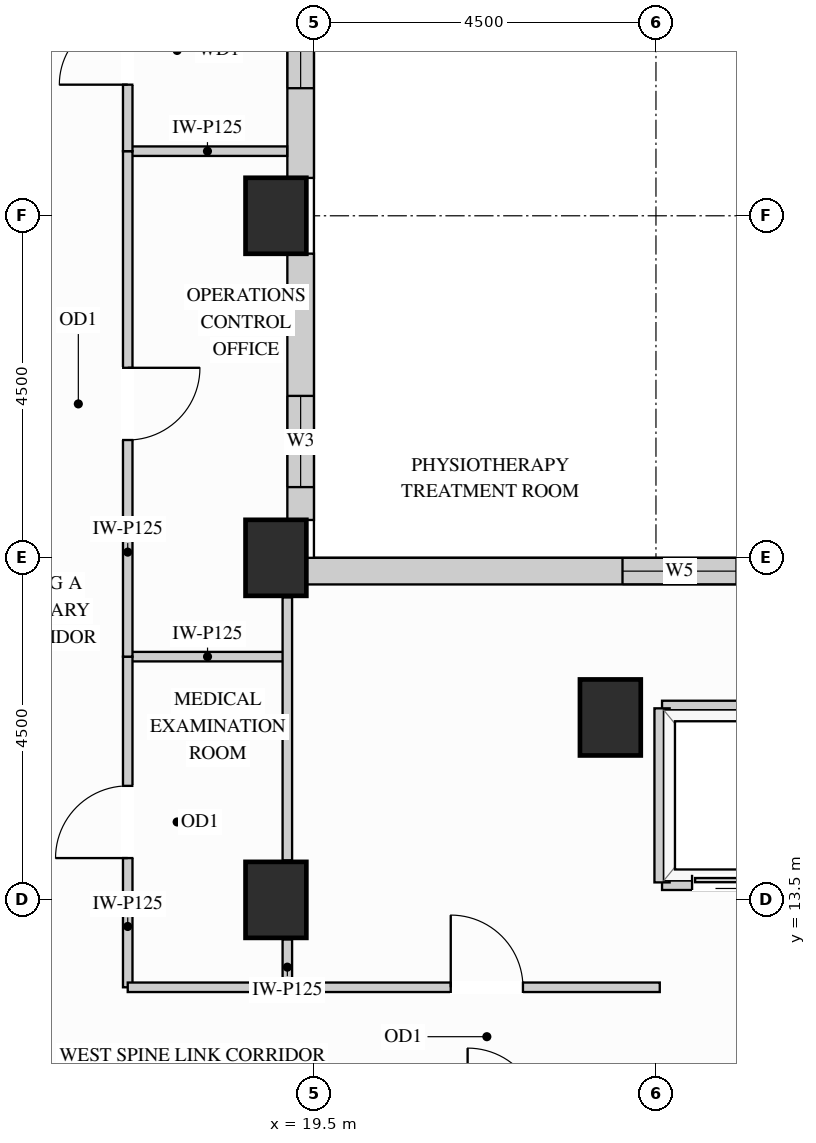
"""IFC4 building model, lengths in metres.
Left out: names, types, materials, properties, quantities, classifications, styles, units other than length and angle.
Written with IfcOpenShell. Run it as: python <this file> out.ifc"""

import sys

from ifc_helpers import new_model, si_unit, direction, frame, frame_2d, origin, origin_2d, place, context, subcontext, project, spatial, rectangle, extrude, source, transform, mapped, element, fill, save


model = new_model("IFC4")
c1 = context("Model", 3, precision=1e-05, world=origin(), true_north=direction((0.0, 1.0)))
c2 = subcontext(c1, "Body", "Model", "MODEL_VIEW")
j1 = project(units=[si_unit("LENGTHUNIT", "METRE"), si_unit("PLANEANGLEUNIT", "RADIAN")], contexts=[c1])
p1 = place(None, origin())
s1 = spatial("IfcSite", under=j1, at=p1, CompositionType="ELEMENT")
p2 = place(p1, origin())
s2 = spatial("IfcBuilding", under=s1, at=p2, CompositionType="ELEMENT")
p3 = place(p2, frame((0.0, 0.0, 157.5)))
s3 = spatial("IfcBuildingStorey", under=s2, at=p3, CompositionType="ELEMENT", Elevation=157.5)
m1 = source(origin(), c2, "Body", "SweptSolid", [
    extrude(rectangle(XDim=0.8, YDim=1.0, at=origin_2d()), origin(), (0.0, 0.0, 1.0), 3.4),
])
for number, where, z_axis, x_axis in (
    (1, (19.0, 13.5, 0.0), (0.0, 0.0, 1.0), (1.0, 0.0, 0.0)),
    (2, (19.0, 18.0, 0.0), (0.0, 0.0, 1.0), (1.0, 0.0, 0.0)),
    (3, (19.0, 22.5, 0.0), (0.0, 0.0, 1.0), (1.0, 0.0, 0.0)),
    (4, (23.4, 15.9, 0.0), (0.0, 0.0, 1.0), (1.0, 0.0, 0.0)),
):
    element("IfcColumn", number, at=place(p3, frame(where, z_axis=z_axis, x_axis=x_axis)), inside=s3, PredefinedType="COLUMN", context=c2, shape_type="MappedRepresentation", body=[
        mapped(m1, transform((0.0, 0.0, 0.0), x_axis=(1.0, 0.0, 0.0), y_axis=(0.0, 1.0, 0.0), z_axis=(0.0, 0.0, 1.0))),
    ])
p4 = place(p3, frame((34.502, 17.825, 0.0), z_axis=(0.0, 0.0, 1.0), x_axis=(-1.0, 0.0, 0.0)))
e5 = element("IfcWall", 5, at=p4, inside=s3, PredefinedType="SOLIDWALL", context=c2, shape_type="SweptSolid", body=[
    extrude(rectangle(XDim=15.104, YDim=0.35, at=frame_2d((7.552, 0.0))), origin(), (0.0, 0.0, 1.0), 3.385),
])
p5 = place(p4, frame((4.131, 0.0, 0.78)))
e6 = element("IfcOpeningElement", 6, at=p5, cuts=e5, PredefinedType="OPENING", context=c2, shape_type="SweptSolid", body=[
    extrude(rectangle(XDim=1.5, YDim=2.0, at=frame_2d((0.75, 1.0))), frame((0.0, 0.185, 0.0), z_axis=(0.0, -1.0, 0.0), x_axis=(1.0, 0.0, 0.0)), (0.0, 0.0, 1.0), 0.37),
])
p6 = place(p4, frame((9.442, 0.0, 0.78)))
e7 = element("IfcOpeningElement", 7, at=p6, cuts=e5, PredefinedType="OPENING", context=c2, shape_type="SweptSolid", body=[
    extrude(rectangle(XDim=1.5, YDim=2.0, at=frame_2d((0.75, 1.0))), frame((0.0, 0.185, 0.0), z_axis=(0.0, -1.0, 0.0), x_axis=(1.0, 0.0, 0.0)), (0.0, 0.0, 1.0), 0.37),
])
p7 = place(p3, frame((19.325, 18.498, 0.0), z_axis=(0.0, 0.0, 1.0), x_axis=(0.0, 1.0, 0.0)))
e8 = element("IfcWall", 8, at=p7, inside=s3, PredefinedType="SOLIDWALL", context=c2, shape_type="SweptSolid", body=[
    extrude(rectangle(XDim=3.504, YDim=0.35, at=frame_2d((1.752, 0.0))), origin(), (0.0, 0.0, 1.0), 2.612),
])
p8 = place(p7, frame((0.433, 0.0, 0.78)))
e9 = element("IfcOpeningElement", 9, at=p8, cuts=e8, PredefinedType="OPENING", context=c2, shape_type="SweptSolid", body=[
    extrude(rectangle(XDim=1.2, YDim=1.652, at=frame_2d((0.6, 0.826))), frame((0.0, 0.185, 0.0), z_axis=(0.0, -1.0, 0.0), x_axis=(1.0, 0.0, 0.0)), (0.0, 0.0, 1.0), 0.37),
])
p9 = place(p3, frame((19.325, 22.998, 0.0), z_axis=(0.0, 0.0, 1.0), x_axis=(0.0, 1.0, 0.0)))
e10 = element("IfcWall", 10, at=p9, inside=s3, PredefinedType="SOLIDWALL", context=c2, shape_type="SweptSolid", body=[
    extrude(rectangle(XDim=3.304, YDim=0.35, at=frame_2d((1.652, 0.0))), origin(), (0.0, 0.0, 1.0), 2.612),
])
p10 = place(p9, frame((1.18, 0.0, 0.78)))
e11 = element("IfcOpeningElement", 11, at=p10, cuts=e10, PredefinedType="OPENING", context=c2, shape_type="SweptSolid", body=[
    extrude(rectangle(XDim=1.5, YDim=1.652, at=frame_2d((0.75, 0.826))), frame((0.0, 0.185, 0.0), z_axis=(0.0, -1.0, 0.0), x_axis=(1.0, 0.0, 0.0)), (0.0, 0.0, 1.0), 0.37),
])
m2 = source(origin(), c2, "Body", "SweptSolid", [
    extrude(rectangle(XDim=2.1, YDim=0.125, at=frame_2d((1.05, 0.0))), origin(), (0.0, 0.0, 1.0), 2.916),
])
p11 = place(p3, frame((17.05, 16.7, 0.0), z_axis=(0.0, 0.0, 1.0), x_axis=(1.0, 0.0, 0.0)))
e12 = element("IfcWall", 12, at=p11, inside=s3, PredefinedType="PARTITIONING", context=c2, shape_type="MappedRepresentation", body=[
    mapped(m2, transform((0.0, 0.0, 0.0), x_axis=(1.0, 0.0, 0.0), y_axis=(0.0, 1.0, 0.0), z_axis=(0.0, 0.0, 1.0))),
])
m3 = source(origin(), c2, "Body", "SweptSolid", [
    extrude(rectangle(XDim=2.098, YDim=0.125, at=frame_2d((1.049, 0.0))), origin(), (0.0, 0.0, 1.0), 3.385),
])
p12 = place(p3, frame((17.05, 23.35, 0.0), z_axis=(0.0, 0.0, 1.0), x_axis=(1.0, 0.0, 0.0)))
e13 = element("IfcWall", 13, at=p12, inside=s3, PredefinedType="PARTITIONING", context=c2, shape_type="MappedRepresentation", body=[
    mapped(m3, transform((0.0, 0.0, 0.0), x_axis=(1.0, 0.0, 0.0), y_axis=(0.0, 1.0, 0.0), z_axis=(0.0, 0.0, 1.0))),
])
m4 = source(origin(), c2, "Body", "SweptSolid", [
    extrude(rectangle(XDim=0.63, YDim=0.125, at=frame_2d((0.315, 0.0))), origin(), (0.0, 0.0, 1.0), 2.773),
])
p13 = place(p3, frame((19.15, 12.35, 0.0), z_axis=(0.0, 0.0, 1.0), x_axis=(0.0, 1.0, 0.0)))
e14 = element("IfcWall", 14, at=p13, inside=s3, PredefinedType="PARTITIONING", context=c2, shape_type="MappedRepresentation", body=[
    mapped(m4, transform((0.0, 0.0, 0.0), x_axis=(1.0, 0.0, 0.0), y_axis=(0.0, 1.0, 0.0), z_axis=(0.0, 0.0, 1.0))),
])
m5 = source(origin(), c2, "Body", "SweptSolid", [
    extrude(rectangle(XDim=3.46, YDim=0.125, at=frame_2d((1.73, 0.0))), origin(), (0.0, 0.0, 1.0), 2.773),
])
p14 = place(p3, frame((19.15, 14.02, 0.0), z_axis=(0.0, 0.0, 1.0), x_axis=(0.0, 1.0, 0.0)))
e15 = element("IfcWall", 15, at=p14, inside=s3, PredefinedType="PARTITIONING", context=c2, shape_type="MappedRepresentation", body=[
    mapped(m5, transform((0.0, 0.0, 0.0), x_axis=(1.0, 0.0, 0.0), y_axis=(0.0, 1.0, 0.0), z_axis=(0.0, 0.0, 1.0))),
])
p15 = place(p3, frame((17.05, 12.35, 0.0), z_axis=(0.0, 0.0, 1.0), x_axis=(0.0, 1.0, 0.0)))
e16 = element("IfcWall", 16, at=p15, inside=s3, PredefinedType="PARTITIONING", context=c2, shape_type="SweptSolid", body=[
    extrude(rectangle(XDim=4.35, YDim=0.125, at=frame_2d((2.175, 0.0))), origin(), (0.0, 0.0, 1.0), 3.385),
])
p16 = place(p15, frame((1.7, 0.0, 0.0)))
e17 = element("IfcOpeningElement", 17, at=p16, cuts=e16, PredefinedType="OPENING", context=c2, shape_type="SweptSolid", body=[
    extrude(rectangle(XDim=0.95, YDim=2.15, at=frame_2d((0.475, 1.075))), frame((0.0, 0.073, 0.0), z_axis=(0.0, -1.0, 0.0), x_axis=(1.0, 0.0, 0.0)), (0.0, 0.0, 1.0), 0.145),
])
p17 = place(p3, frame((17.05, 16.7, 0.0), z_axis=(0.0, 0.0, 1.0), x_axis=(0.0, 1.0, 0.0)))
e18 = element("IfcWall", 18, at=p17, inside=s3, PredefinedType="PARTITIONING", context=c2, shape_type="SweptSolid", body=[
    extrude(rectangle(XDim=6.65, YDim=0.125, at=frame_2d((3.325, 0.0))), origin(), (0.0, 0.0, 1.0), 3.385),
])
p18 = place(p17, frame((2.85, 0.0, 0.0)))
e19 = element("IfcOpeningElement", 19, at=p18, cuts=e18, PredefinedType="OPENING", context=c2, shape_type="SweptSolid", body=[
    extrude(rectangle(XDim=0.95, YDim=2.15, at=frame_2d((0.475, 1.075))), frame((0.0, 0.073, 0.0), z_axis=(0.0, -1.0, 0.0), x_axis=(1.0, 0.0, 0.0)), (0.0, 0.0, 1.0), 0.145),
])
p19 = place(p3, frame((17.05, 23.35, 0.0), z_axis=(0.0, 0.0, 1.0), x_axis=(0.0, 1.0, 0.0)))
e20 = element("IfcWall", 20, at=p19, inside=s3, PredefinedType="PARTITIONING", context=c2, shape_type="SweptSolid", body=[
    extrude(rectangle(XDim=2.7, YDim=0.125, at=frame_2d((1.35, 0.0))), origin(), (0.0, 0.0, 1.0), 3.385),
])
p20 = place(p19, frame((0.875, 0.0, 0.0)))
e21 = element("IfcOpeningElement", 21, at=p20, cuts=e20, PredefinedType="OPENING", context=c2, shape_type="SweptSolid", body=[
    extrude(rectangle(XDim=0.9, YDim=2.15, at=frame_2d((0.45, 1.075))), frame((0.0, 0.073, 0.0), z_axis=(0.0, -1.0, 0.0), x_axis=(1.0, 0.0, 0.0)), (0.0, 0.0, 1.0), 0.145),
])
m6 = source(origin(), c2, "Body", "SweptSolid", [
    extrude(rectangle(XDim=2.45, YDim=0.125, at=frame_2d((1.225, 0.0))), origin(), (0.0, 0.0, 1.0), 3.385),
])
p21 = place(p3, frame((17.05, 12.35, 0.0), z_axis=(0.0, 0.0, 1.0), x_axis=(1.0, 0.0, 0.0)))
e22 = element("IfcWall", 22, at=p21, inside=s3, PredefinedType="PARTITIONING", context=c2, shape_type="MappedRepresentation", body=[
    mapped(m6, transform((0.0, 0.0, 0.0), x_axis=(1.0, 0.0, 0.0), y_axis=(0.0, 1.0, 0.0), z_axis=(0.0, 0.0, 1.0))),
])
p22 = place(p3, frame((19.5, 12.35, 0.0), z_axis=(0.0, 0.0, 1.0), x_axis=(1.0, 0.0, 0.0)))
e23 = element("IfcWall", 23, at=p22, inside=s3, PredefinedType="PARTITIONING", context=c2, shape_type="SweptSolid", body=[
    extrude(rectangle(XDim=4.55, YDim=0.125, at=frame_2d((2.275, 0.0))), origin(), (0.0, 0.0, 1.0), 3.385),
])
p23 = place(p22, frame((1.8, 0.0, 0.0)))
e24 = element("IfcOpeningElement", 24, at=p23, cuts=e23, PredefinedType="OPENING", context=c2, shape_type="SweptSolid", body=[
    extrude(rectangle(XDim=0.95, YDim=2.15, at=frame_2d((0.475, 1.075))), frame((0.0, 0.073, 0.0), z_axis=(0.0, -1.0, 0.0), x_axis=(1.0, 0.0, 0.0)), (0.0, 0.0, 1.0), 0.145),
])
m7 = source(origin(), c2, "Body", "SweptSolid", [
    extrude(rectangle(XDim=1.89, YDim=0.2, at=frame_2d((0.945, 0.0))), origin(), (0.0, 0.0, 1.0), 2.773),
])
p24 = place(p3, frame((24.08, 16.02, 0.0), z_axis=(0.0, 0.0, 1.0), x_axis=(1.0, 0.0, 0.0)))
e25 = element("IfcWall", 25, at=p24, inside=s3, PredefinedType="PARTITIONING", context=c2, shape_type="MappedRepresentation", body=[
    mapped(m7, transform((0.0, 0.0, 0.0), x_axis=(1.0, 0.0, 0.0), y_axis=(0.0, 1.0, 0.0), z_axis=(0.0, 0.0, 1.0))),
])
p25 = place(p3, frame((24.08, 13.73, 0.0), z_axis=(0.0, 0.0, 1.0), x_axis=(1.0, 0.0, 0.0)))
e26 = element("IfcWall", 26, at=p25, inside=s3, PredefinedType="PARTITIONING", context=c2, shape_type="SweptSolid", body=[
    extrude(rectangle(XDim=1.89, YDim=0.2, at=frame_2d((0.945, 0.0))), origin(), (0.0, 0.0, 1.0), 2.466),
])
p26 = place(p25, frame((0.395, 0.0, 0.0)))
e27 = element("IfcOpeningElement", 27, at=p26, cuts=e26, PredefinedType="OPENING", context=c2, shape_type="SweptSolid", body=[
    extrude(rectangle(XDim=1.1, YDim=2.2, at=frame_2d((0.55, 1.1))), frame((0.0, 0.11, 0.0), z_axis=(0.0, -1.0, 0.0), x_axis=(1.0, 0.0, 0.0)), (0.0, 0.0, 1.0), 0.22),
])
m8 = source(origin(), c2, "Body", "SweptSolid", [
    extrude(rectangle(XDim=2.29, YDim=0.2, at=frame_2d((1.145, 0.0))), origin(), (0.0, 0.0, 1.0), 3.385),
])
p27 = place(p3, frame((24.08, 13.73, 0.0), z_axis=(0.0, 0.0, 1.0), x_axis=(0.0, 1.0, 0.0)))
e28 = element("IfcWall", 28, at=p27, inside=s3, PredefinedType="PARTITIONING", context=c2, shape_type="MappedRepresentation", body=[
    mapped(m8, transform((0.0, 0.0, 0.0), x_axis=(1.0, 0.0, 0.0), y_axis=(0.0, 1.0, 0.0), z_axis=(0.0, 0.0, 1.0))),
])
m9 = source(origin(), c2, "Body", "SweptSolid", [
    extrude(rectangle(XDim=1.1, YDim=2.2, at=frame_2d((0.55, 1.1))), frame((0.0, 0.025, 0.0), z_axis=(0.0, -1.0, 0.0), x_axis=(1.0, 0.0, 0.0)), (0.0, 0.0, 1.0), 0.05),
])
p28 = place(p26, origin())
e29 = element("IfcDoor", 29, at=p28, inside=s3, OperationType="SLIDING_TO_LEFT", PredefinedType="DOOR", context=c2, shape_type="MappedRepresentation", body=[
    mapped(m9, transform((0.0, 0.0, 0.0), x_axis=(1.0, 0.0, 0.0), y_axis=(0.0, 1.0, 0.0), z_axis=(0.0, 0.0, 1.0))),
])
fill(e27, e29)
m10 = source(origin(), c2, "Body", "SweptSolid", [
    extrude(rectangle(XDim=0.95, YDim=2.15, at=frame_2d((0.475, 1.075))), frame((0.0, 0.025, 0.0), z_axis=(0.0, -1.0, 0.0), x_axis=(1.0, 0.0, 0.0)), (0.0, 0.0, 1.0), 0.05),
])
p29 = place(p16, origin())
e30 = element("IfcDoor", 30, at=p29, inside=s3, OperationType="SINGLE_SWING_LEFT", PredefinedType="DOOR", context=c2, shape_type="MappedRepresentation", body=[
    mapped(m10, transform((0.0, 0.0, 0.0), x_axis=(1.0, 0.0, 0.0), y_axis=(0.0, 1.0, 0.0), z_axis=(0.0, 0.0, 1.0))),
])
fill(e17, e30)
p30 = place(p18, origin())
e31 = element("IfcDoor", 31, at=p30, inside=s3, OperationType="SINGLE_SWING_RIGHT", PredefinedType="DOOR", context=c2, shape_type="MappedRepresentation", body=[
    mapped(m10, transform((0.0, 0.0, 0.0), x_axis=(1.0, 0.0, 0.0), y_axis=(0.0, 1.0, 0.0), z_axis=(0.0, 0.0, 1.0))),
])
fill(e19, e31)
p31 = place(p23, origin())
e32 = element("IfcDoor", 32, at=p31, inside=s3, OperationType="SINGLE_SWING_LEFT", PredefinedType="DOOR", context=c2, shape_type="MappedRepresentation", body=[
    mapped(m10, transform((0.0, 0.0, 0.0), x_axis=(1.0, 0.0, 0.0), y_axis=(0.0, 1.0, 0.0), z_axis=(0.0, 0.0, 1.0))),
])
fill(e24, e32)
m11 = source(origin(), c2, "Body", "SweptSolid", [
    extrude(rectangle(XDim=0.9, YDim=2.15, at=frame_2d((0.45, 1.075))), frame((0.0, 0.025, 0.0), z_axis=(0.0, -1.0, 0.0), x_axis=(1.0, 0.0, 0.0)), (0.0, 0.0, 1.0), 0.05),
])
p32 = place(p20, origin())
e33 = element("IfcDoor", 33, at=p32, inside=s3, OperationType="SINGLE_SWING_LEFT", PredefinedType="DOOR", context=c2, shape_type="MappedRepresentation", body=[
    mapped(m11, transform((0.0, 0.0, 0.0), x_axis=(1.0, 0.0, 0.0), y_axis=(0.0, 1.0, 0.0), z_axis=(0.0, 0.0, 1.0))),
])
fill(e21, e33)
m12 = source(origin(), c2, "Body", "SweptSolid", [
    extrude(rectangle(XDim=1.2, YDim=1.652, at=frame_2d((0.6, 0.826))), frame((0.0, 0.03, 0.0), z_axis=(0.0, -1.0, 0.0), x_axis=(1.0, 0.0, 0.0)), (0.0, 0.0, 1.0), 0.06),
])
p33 = place(p8, origin())
e34 = element("IfcWindow", 34, at=p33, inside=s3, PartitioningType="SINGLE_PANEL", PredefinedType="WINDOW", context=c2, shape_type="MappedRepresentation", body=[
    mapped(m12, transform((0.0, 0.0, 0.0), x_axis=(1.0, 0.0, 0.0), y_axis=(0.0, 1.0, 0.0), z_axis=(0.0, 0.0, 1.0))),
])
fill(e9, e34)
m13 = source(origin(), c2, "Body", "SweptSolid", [
    extrude(rectangle(XDim=1.5, YDim=2.0, at=frame_2d((0.75, 1.0))), frame((0.0, 0.03, 0.0), z_axis=(0.0, -1.0, 0.0), x_axis=(1.0, 0.0, 0.0)), (0.0, 0.0, 1.0), 0.06),
])
p34 = place(p6, origin())
e35 = element("IfcWindow", 35, at=p34, inside=s3, PartitioningType="SINGLE_PANEL", PredefinedType="WINDOW", context=c2, shape_type="MappedRepresentation", body=[
    mapped(m13, transform((0.0, 0.0, 0.0), x_axis=(1.0, 0.0, 0.0), y_axis=(0.0, 1.0, 0.0), z_axis=(0.0, 0.0, 1.0))),
])
fill(e7, e35)
m14 = source(origin(), c2, "Body", "SweptSolid", [
    extrude(rectangle(XDim=1.5, YDim=1.652, at=frame_2d((0.75, 0.826))), frame((0.0, 0.03, 0.0), z_axis=(0.0, -1.0, 0.0), x_axis=(1.0, 0.0, 0.0)), (0.0, 0.0, 1.0), 0.06),
])
p35 = place(p10, origin())
e36 = element("IfcWindow", 36, at=p35, inside=s3, PartitioningType="SINGLE_PANEL", PredefinedType="WINDOW", context=c2, shape_type="MappedRepresentation", body=[
    mapped(m14, transform((0.0, 0.0, 0.0), x_axis=(1.0, 0.0, 0.0), y_axis=(0.0, 1.0, 0.0), z_axis=(0.0, 0.0, 1.0))),
])
fill(e11, e36)
save(model, sys.argv[1])
